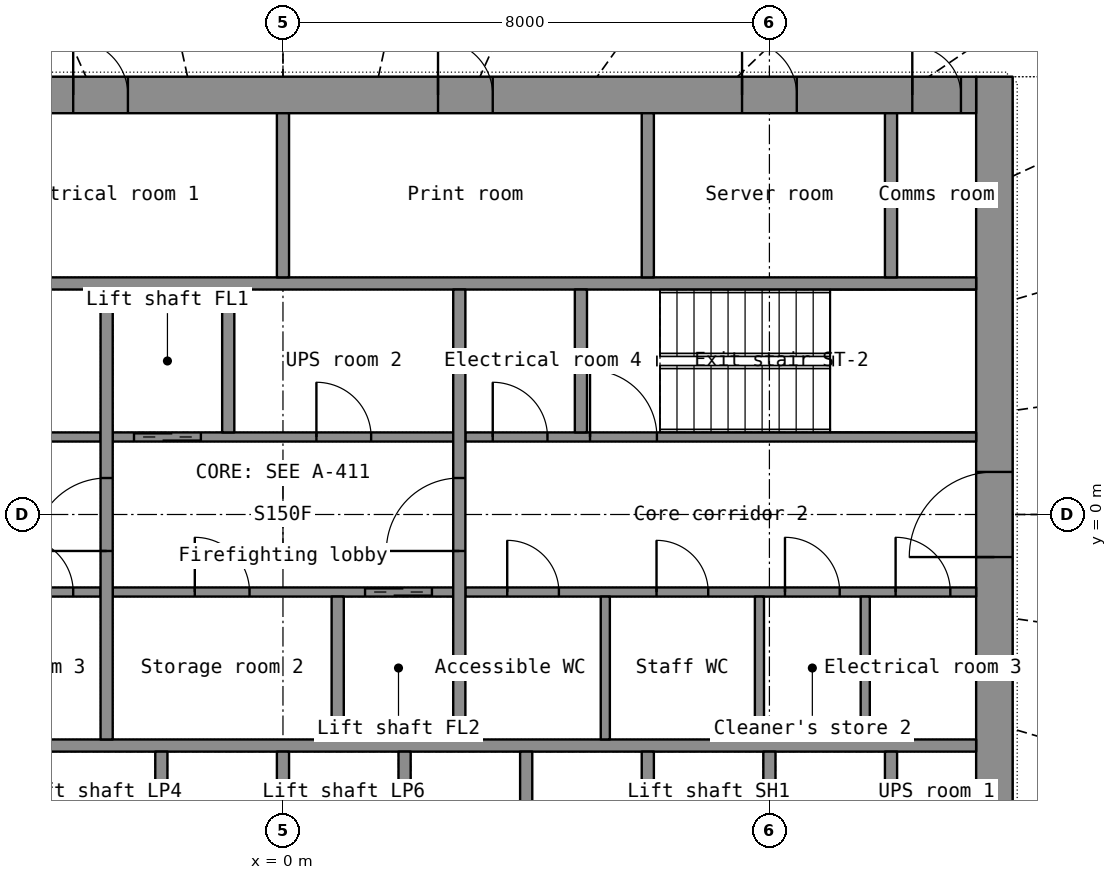
"""IFC4 building model, lengths in metres.
Left out: names, types, materials, properties, quantities, classifications, styles, units other than length and angle.
Written with IfcOpenShell. Run it as: python <this file> out.ifc"""

import sys

from ifc_helpers import new_model, si_unit, direction, frame, frame_2d, origin, place, context, subcontext, project, spatial, rectangle, extrude, element, fill, save


model = new_model("IFC4")
c1 = context("Model", 3, precision=1e-05, world=origin(), true_north=direction((0.0, 1.0)))
c2 = subcontext(c1, "Body", "Model", "MODEL_VIEW")
j1 = project(units=[si_unit("LENGTHUNIT", "METRE"), si_unit("PLANEANGLEUNIT", "RADIAN")], contexts=[c1])
p1 = place(None, origin())
s1 = spatial("IfcSite", under=j1, at=p1, CompositionType="ELEMENT")
p2 = place(p1, origin())
s2 = spatial("IfcBuilding", under=s1, at=p2, CompositionType="ELEMENT")
p3 = place(p2, frame((0.0, 0.0, 74.1)))
s3 = spatial("IfcBuildingStorey", under=s2, at=p3, CompositionType="ELEMENT", Elevation=74.1)
p4 = place(p3, frame((11.7, -7.2, 0.0), z_axis=(0.0, 0.0, 1.0), x_axis=(0.0, 1.0, 0.0)))
e1 = element("IfcWall", 1, at=p4, inside=s3, PredefinedType="SHEAR", context=c2, shape_type="SweptSolid", body=[
    extrude(rectangle(XDim=14.4, YDim=0.6, at=frame_2d((7.2, 0.0))), origin(), (0.0, 0.0, 1.0), 3.3),
])
p5 = place(p4, frame((6.5, 0.0, 0.0)))
e2 = element("IfcOpeningElement", 2, at=p5, cuts=e1, PredefinedType="OPENING", context=c2, shape_type="SweptSolid", body=[
    extrude(rectangle(XDim=1.4, YDim=2.2, at=frame_2d((0.7, 1.1))), frame((0.0, 0.31, 0.0), z_axis=(0.0, -1.0, 0.0), x_axis=(1.0, 0.0, 0.0)), (0.0, 0.0, 1.0), 0.62),
])
p6 = place(p3, frame((-11.4, 6.9, 0.0), z_axis=(0.0, 0.0, 1.0), x_axis=(1.0, 0.0, 0.0)))
e3 = element("IfcWall", 3, at=p6, inside=s3, PredefinedType="SHEAR", context=c2, shape_type="SweptSolid", body=[
    extrude(rectangle(XDim=22.8, YDim=0.6, at=frame_2d((11.4, 0.0))), origin(), (0.0, 0.0, 1.0), 3.3),
])
p7 = place(p6, frame((1.85, 0.0, 0.0)))
e4 = element("IfcOpeningElement", 4, at=p7, cuts=e3, PredefinedType="OPENING", context=c2, shape_type="SweptSolid", body=[
    extrude(rectangle(XDim=1.1, YDim=2.2, at=frame_2d((0.55, 1.1))), frame((0.0, 0.31, 0.0), z_axis=(0.0, -1.0, 0.0), x_axis=(1.0, 0.0, 0.0)), (0.0, 0.0, 1.0), 0.62),
])
p8 = place(p6, frame((7.95, 0.0, 0.0)))
e5 = element("IfcOpeningElement", 5, at=p8, cuts=e3, PredefinedType="OPENING", context=c2, shape_type="SweptSolid", body=[
    extrude(rectangle(XDim=0.9, YDim=2.1, at=frame_2d((0.45, 1.05))), frame((0.0, 0.31, 0.0), z_axis=(0.0, -1.0, 0.0), x_axis=(1.0, 0.0, 0.0)), (0.0, 0.0, 1.0), 0.62),
])
p9 = place(p6, frame((13.95, 0.0, 0.0)))
e6 = element("IfcOpeningElement", 6, at=p9, cuts=e3, PredefinedType="OPENING", context=c2, shape_type="SweptSolid", body=[
    extrude(rectangle(XDim=0.9, YDim=2.1, at=frame_2d((0.45, 1.05))), frame((0.0, 0.31, 0.0), z_axis=(0.0, -1.0, 0.0), x_axis=(1.0, 0.0, 0.0)), (0.0, 0.0, 1.0), 0.62),
])
p10 = place(p6, frame((18.95, 0.0, 0.0)))
e7 = element("IfcOpeningElement", 7, at=p10, cuts=e3, PredefinedType="OPENING", context=c2, shape_type="SweptSolid", body=[
    extrude(rectangle(XDim=0.9, YDim=2.1, at=frame_2d((0.45, 1.05))), frame((0.0, 0.31, 0.0), z_axis=(0.0, -1.0, 0.0), x_axis=(1.0, 0.0, 0.0)), (0.0, 0.0, 1.0), 0.62),
])
p11 = place(p6, frame((0.25, 0.0, 0.0)))
e8 = element("IfcOpeningElement", 8, at=p11, cuts=e3, PredefinedType="OPENING", context=c2, shape_type="SweptSolid", body=[
    extrude(rectangle(XDim=0.8, YDim=2.05, at=frame_2d((0.4, 1.025))), frame((0.0, 0.31, 0.0), z_axis=(0.0, -1.0, 0.0), x_axis=(1.0, 0.0, 0.0)), (0.0, 0.0, 1.0), 0.62),
])
p12 = place(p6, frame((21.75, 0.0, 0.0)))
e9 = element("IfcOpeningElement", 9, at=p12, cuts=e3, PredefinedType="OPENING", context=c2, shape_type="SweptSolid", body=[
    extrude(rectangle(XDim=0.8, YDim=2.05, at=frame_2d((0.4, 1.025))), frame((0.0, 0.31, 0.0), z_axis=(0.0, -1.0, 0.0), x_axis=(1.0, 0.0, 0.0)), (0.0, 0.0, 1.0), 0.62),
])
for number, where, z_axis, x_axis in (
    (10, (-11.4, -3.8, 0.0), (0.0, 0.0, 1.0), (1.0, 0.0, 0.0)),
    (11, (-11.4, 3.8, 0.0), (0.0, 0.0, 1.0), (1.0, 0.0, 0.0)),
):
    element("IfcWall", number, at=place(p3, frame(where, z_axis=z_axis, x_axis=x_axis)), inside=s3, PredefinedType="SHEAR", context=c2, shape_type="SweptSolid", body=[
        extrude(rectangle(XDim=22.8, YDim=0.2, at=frame_2d((11.4, 0.0))), origin(), (0.0, 0.0, 1.0), 3.3),
    ])
for number, where, z_axis, x_axis in (
    (12, (-2.0, -6.6, 0.0), (0.0, 0.0, 1.0), (0.0, 1.0, 0.0)),
    (13, (0.0, -6.6, 0.0), (0.0, 0.0, 1.0), (0.0, 1.0, 0.0)),
    (14, (2.0, -6.6, 0.0), (0.0, 0.0, 1.0), (0.0, 1.0, 0.0)),
    (15, (4.0, -6.6, 0.0), (0.0, 0.0, 1.0), (0.0, 1.0, 0.0)),
    (16, (6.0, -6.6, 0.0), (0.0, 0.0, 1.0), (0.0, 1.0, 0.0)),
    (17, (8.0, -6.6, 0.0), (0.0, 0.0, 1.0), (0.0, 1.0, 0.0)),
    (18, (10.0, -6.6, 0.0), (0.0, 0.0, 1.0), (0.0, 1.0, 0.0)),
    (19, (10.0, 3.9, 0.0), (0.0, 0.0, 1.0), (0.0, 1.0, 0.0)),
):
    element("IfcWall", number, at=place(p3, frame(where, z_axis=z_axis, x_axis=x_axis)), inside=s3, PredefinedType="SHEAR", context=c2, shape_type="SweptSolid", body=[
        extrude(rectangle(XDim=2.7, YDim=0.2, at=frame_2d((1.35, 0.0))), origin(), (0.0, 0.0, 1.0), 3.3),
    ])
for number, where, z_axis, x_axis in (
    (20, (0.0, 3.9, 0.0), (0.0, 0.0, 1.0), (0.0, 1.0, 0.0)),
    (21, (6.0, 3.9, 0.0), (0.0, 0.0, 1.0), (0.0, 1.0, 0.0)),
):
    element("IfcWall", number, at=place(p3, frame(where, z_axis=z_axis, x_axis=x_axis)), inside=s3, PredefinedType="PARTITIONING", context=c2, shape_type="SweptSolid", body=[
        extrude(rectangle(XDim=2.7, YDim=0.2, at=frame_2d((1.35, 0.0))), origin(), (0.0, 0.0, 1.0), 3.3),
    ])
p13 = place(p3, frame((-11.4, -1.275, 0.0), z_axis=(0.0, 0.0, 1.0), x_axis=(1.0, 0.0, 0.0)))
e22 = element("IfcWall", 22, at=p13, inside=s3, PredefinedType="SHEAR", context=c2, shape_type="SweptSolid", body=[
    extrude(rectangle(XDim=8.4, YDim=0.15, at=frame_2d((4.2, 0.0))), origin(), (0.0, 0.0, 1.0), 3.3),
])
p14 = place(p13, frame((5.25, 0.0, 0.0)))
e23 = element("IfcOpeningElement", 23, at=p14, cuts=e22, PredefinedType="OPENING", context=c2, shape_type="SweptSolid", body=[
    extrude(rectangle(XDim=1.1, YDim=2.15, at=frame_2d((0.55, 1.075))), frame((0.0, 0.085, 0.0), z_axis=(0.0, -1.0, 0.0), x_axis=(1.0, 0.0, 0.0)), (0.0, 0.0, 1.0), 0.17),
])
p15 = place(p13, frame((7.05, 0.0, 0.0)))
e24 = element("IfcOpeningElement", 24, at=p15, cuts=e22, PredefinedType="OPENING", context=c2, shape_type="SweptSolid", body=[
    extrude(rectangle(XDim=0.9, YDim=2.1, at=frame_2d((0.45, 1.05))), frame((0.0, 0.085, 0.0), z_axis=(0.0, -1.0, 0.0), x_axis=(1.0, 0.0, 0.0)), (0.0, 0.0, 1.0), 0.17),
])
p16 = place(p3, frame((-2.8, -1.275, 0.0), z_axis=(0.0, 0.0, 1.0), x_axis=(1.0, 0.0, 0.0)))
e25 = element("IfcWall", 25, at=p16, inside=s3, PredefinedType="SHEAR", context=c2, shape_type="SweptSolid", body=[
    extrude(rectangle(XDim=5.6, YDim=0.15, at=frame_2d((2.8, 0.0))), origin(), (0.0, 0.0, 1.0), 3.3),
])
p17 = place(p16, frame((4.15, 0.0, 0.0)))
e26 = element("IfcOpeningElement", 26, at=p17, cuts=e25, PredefinedType="OPENING", context=c2, shape_type="SweptSolid", body=[
    extrude(rectangle(XDim=1.1, YDim=2.2, at=frame_2d((0.55, 1.1))), frame((0.0, 0.085, 0.0), z_axis=(0.0, -1.0, 0.0), x_axis=(1.0, 0.0, 0.0)), (0.0, 0.0, 1.0), 0.17),
])
p18 = place(p16, frame((1.35, 0.0, 0.0)))
e27 = element("IfcOpeningElement", 27, at=p18, cuts=e25, PredefinedType="OPENING", context=c2, shape_type="SweptSolid", body=[
    extrude(rectangle(XDim=0.9, YDim=2.1, at=frame_2d((0.45, 1.05))), frame((0.0, 0.085, 0.0), z_axis=(0.0, -1.0, 0.0), x_axis=(1.0, 0.0, 0.0)), (0.0, 0.0, 1.0), 0.17),
])
p19 = place(p3, frame((3.0, -1.275, 0.0), z_axis=(0.0, 0.0, 1.0), x_axis=(1.0, 0.0, 0.0)))
e28 = element("IfcWall", 28, at=p19, inside=s3, PredefinedType="PARTITIONING", context=c2, shape_type="SweptSolid", body=[
    extrude(rectangle(XDim=8.4, YDim=0.15, at=frame_2d((4.2, 0.0))), origin(), (0.0, 0.0, 1.0), 3.3),
])
p20 = place(p19, frame((0.688, 0.0, 0.0)))
e29 = element("IfcOpeningElement", 29, at=p20, cuts=e28, PredefinedType="OPENING", context=c2, shape_type="SweptSolid", body=[
    extrude(rectangle(XDim=0.85, YDim=2.1, at=frame_2d((0.425, 1.05))), frame((0.0, 0.085, 0.0), z_axis=(0.0, -1.0, 0.0), x_axis=(1.0, 0.0, 0.0)), (0.0, 0.0, 1.0), 0.17),
])
p21 = place(p19, frame((3.144, 0.0, 0.0)))
e30 = element("IfcOpeningElement", 30, at=p21, cuts=e28, PredefinedType="OPENING", context=c2, shape_type="SweptSolid", body=[
    extrude(rectangle(XDim=0.85, YDim=2.1, at=frame_2d((0.425, 1.05))), frame((0.0, 0.085, 0.0), z_axis=(0.0, -1.0, 0.0), x_axis=(1.0, 0.0, 0.0)), (0.0, 0.0, 1.0), 0.17),
])
p22 = place(p19, frame((5.256, 0.0, 0.0)))
e31 = element("IfcOpeningElement", 31, at=p22, cuts=e28, PredefinedType="OPENING", context=c2, shape_type="SweptSolid", body=[
    extrude(rectangle(XDim=0.9, YDim=2.1, at=frame_2d((0.45, 1.05))), frame((0.0, 0.085, 0.0), z_axis=(0.0, -1.0, 0.0), x_axis=(1.0, 0.0, 0.0)), (0.0, 0.0, 1.0), 0.17),
])
p23 = place(p19, frame((7.075, 0.0, 0.0)))
e32 = element("IfcOpeningElement", 32, at=p23, cuts=e28, PredefinedType="OPENING", context=c2, shape_type="SweptSolid", body=[
    extrude(rectangle(XDim=0.9, YDim=2.1, at=frame_2d((0.45, 1.05))), frame((0.0, 0.085, 0.0), z_axis=(0.0, -1.0, 0.0), x_axis=(1.0, 0.0, 0.0)), (0.0, 0.0, 1.0), 0.17),
])
p24 = place(p3, frame((-11.4, 1.275, 0.0), z_axis=(0.0, 0.0, 1.0), x_axis=(1.0, 0.0, 0.0)))
e33 = element("IfcWall", 33, at=p24, inside=s3, PredefinedType="PARTITIONING", context=c2, shape_type="SweptSolid", body=[
    extrude(rectangle(XDim=8.4, YDim=0.15, at=frame_2d((4.2, 0.0))), origin(), (0.0, 0.0, 1.0), 3.3),
])
p25 = place(p24, frame((0.522, 0.0, 0.0)))
e34 = element("IfcOpeningElement", 34, at=p25, cuts=e33, PredefinedType="OPENING", context=c2, shape_type="SweptSolid", body=[
    extrude(rectangle(XDim=0.9, YDim=2.1, at=frame_2d((0.45, 1.05))), frame((0.0, 0.085, 0.0), z_axis=(0.0, -1.0, 0.0), x_axis=(1.0, 0.0, 0.0)), (0.0, 0.0, 1.0), 0.17),
])
p26 = place(p24, frame((3.208, 0.0, 0.0)))
e35 = element("IfcOpeningElement", 35, at=p26, cuts=e33, PredefinedType="OPENING", context=c2, shape_type="SweptSolid", body=[
    extrude(rectangle(XDim=0.85, YDim=2.1, at=frame_2d((0.425, 1.05))), frame((0.0, 0.085, 0.0), z_axis=(0.0, -1.0, 0.0), x_axis=(1.0, 0.0, 0.0)), (0.0, 0.0, 1.0), 0.17),
])
p27 = place(p24, frame((6.436, 0.0, 0.0)))
e36 = element("IfcOpeningElement", 36, at=p27, cuts=e33, PredefinedType="OPENING", context=c2, shape_type="SweptSolid", body=[
    extrude(rectangle(XDim=0.85, YDim=2.1, at=frame_2d((0.425, 1.05))), frame((0.0, 0.085, 0.0), z_axis=(0.0, -1.0, 0.0), x_axis=(1.0, 0.0, 0.0)), (0.0, 0.0, 1.0), 0.17),
])
p28 = place(p3, frame((-2.8, 1.275, 0.0), z_axis=(0.0, 0.0, 1.0), x_axis=(1.0, 0.0, 0.0)))
e37 = element("IfcWall", 37, at=p28, inside=s3, PredefinedType="SHEAR", context=c2, shape_type="SweptSolid", body=[
    extrude(rectangle(XDim=5.6, YDim=0.15, at=frame_2d((2.8, 0.0))), origin(), (0.0, 0.0, 1.0), 3.3),
])
p29 = place(p28, frame((0.35, 0.0, 0.0)))
e38 = element("IfcOpeningElement", 38, at=p29, cuts=e37, PredefinedType="OPENING", context=c2, shape_type="SweptSolid", body=[
    extrude(rectangle(XDim=1.1, YDim=2.2, at=frame_2d((0.55, 1.1))), frame((0.0, 0.085, 0.0), z_axis=(0.0, -1.0, 0.0), x_axis=(1.0, 0.0, 0.0)), (0.0, 0.0, 1.0), 0.17),
])
p30 = place(p28, frame((3.35, 0.0, 0.0)))
e39 = element("IfcOpeningElement", 39, at=p30, cuts=e37, PredefinedType="OPENING", context=c2, shape_type="SweptSolid", body=[
    extrude(rectangle(XDim=0.9, YDim=2.1, at=frame_2d((0.45, 1.05))), frame((0.0, 0.085, 0.0), z_axis=(0.0, -1.0, 0.0), x_axis=(1.0, 0.0, 0.0)), (0.0, 0.0, 1.0), 0.17),
])
p31 = place(p3, frame((3.0, 1.275, 0.0), z_axis=(0.0, 0.0, 1.0), x_axis=(1.0, 0.0, 0.0)))
e40 = element("IfcWall", 40, at=p31, inside=s3, PredefinedType="SHEAR", context=c2, shape_type="SweptSolid", body=[
    extrude(rectangle(XDim=8.4, YDim=0.15, at=frame_2d((4.2, 0.0))), origin(), (0.0, 0.0, 1.0), 3.3),
])
p32 = place(p31, frame((2.05, 0.0, 0.0)))
e41 = element("IfcOpeningElement", 41, at=p32, cuts=e40, PredefinedType="OPENING", context=c2, shape_type="SweptSolid", body=[
    extrude(rectangle(XDim=1.1, YDim=2.15, at=frame_2d((0.55, 1.075))), frame((0.0, 0.085, 0.0), z_axis=(0.0, -1.0, 0.0), x_axis=(1.0, 0.0, 0.0)), (0.0, 0.0, 1.0), 0.17),
])
p33 = place(p31, frame((0.45, 0.0, 0.0)))
e42 = element("IfcOpeningElement", 42, at=p33, cuts=e40, PredefinedType="OPENING", context=c2, shape_type="SweptSolid", body=[
    extrude(rectangle(XDim=0.9, YDim=2.1, at=frame_2d((0.45, 1.05))), frame((0.0, 0.085, 0.0), z_axis=(0.0, -1.0, 0.0), x_axis=(1.0, 0.0, 0.0)), (0.0, 0.0, 1.0), 0.17),
])
p34 = place(p3, frame((-2.9, -3.7, 0.0), z_axis=(0.0, 0.0, 1.0), x_axis=(0.0, 1.0, 0.0)))
e43 = element("IfcWall", 43, at=p34, inside=s3, PredefinedType="SHEAR", context=c2, shape_type="SweptSolid", body=[
    extrude(rectangle(XDim=7.4, YDim=0.2, at=frame_2d((3.7, 0.0))), origin(), (0.0, 0.0, 1.0), 3.3),
])
p35 = place(p34, frame((3.1, 0.0, 0.0)))
e44 = element("IfcOpeningElement", 44, at=p35, cuts=e43, PredefinedType="OPENING", context=c2, shape_type="SweptSolid", body=[
    extrude(rectangle(XDim=1.2, YDim=2.2, at=frame_2d((0.6, 1.1))), frame((0.0, 0.11, 0.0), z_axis=(0.0, -1.0, 0.0), x_axis=(1.0, 0.0, 0.0)), (0.0, 0.0, 1.0), 0.22),
])
p36 = place(p3, frame((2.9, -3.7, 0.0), z_axis=(0.0, 0.0, 1.0), x_axis=(0.0, 1.0, 0.0)))
e45 = element("IfcWall", 45, at=p36, inside=s3, PredefinedType="SHEAR", context=c2, shape_type="SweptSolid", body=[
    extrude(rectangle(XDim=7.4, YDim=0.2, at=frame_2d((3.7, 0.0))), origin(), (0.0, 0.0, 1.0), 3.3),
])
p37 = place(p36, frame((3.1, 0.0, 0.0)))
e46 = element("IfcOpeningElement", 46, at=p37, cuts=e45, PredefinedType="OPENING", context=c2, shape_type="SweptSolid", body=[
    extrude(rectangle(XDim=1.2, YDim=2.2, at=frame_2d((0.6, 1.1))), frame((0.0, 0.11, 0.0), z_axis=(0.0, -1.0, 0.0), x_axis=(1.0, 0.0, 0.0)), (0.0, 0.0, 1.0), 0.22),
])
for number, where, z_axis, x_axis in (
    (47, (-0.9, 1.35, 0.0), (0.0, 0.0, 1.0), (0.0, 1.0, 0.0)),
    (48, (0.9, -3.7, 0.0), (0.0, 0.0, 1.0), (0.0, 1.0, 0.0)),
    (49, (4.9, 1.35, 0.0), (0.0, 0.0, 1.0), (0.0, 1.0, 0.0)),
):
    element("IfcWall", number, at=place(p3, frame(where, z_axis=z_axis, x_axis=x_axis)), inside=s3, PredefinedType="SHEAR", context=c2, shape_type="SweptSolid", body=[
        extrude(rectangle(XDim=2.35, YDim=0.2, at=frame_2d((1.175, 0.0))), origin(), (0.0, 0.0, 1.0), 3.3),
    ])
for number, where, z_axis, x_axis in (
    (50, (5.301, -3.7, 0.0), (0.0, 0.0, 1.0), (0.0, 1.0, 0.0)),
    (51, (7.836, -3.7, 0.0), (0.0, 0.0, 1.0), (0.0, 1.0, 0.0)),
    (52, (9.576, -3.7, 0.0), (0.0, 0.0, 1.0), (0.0, 1.0, 0.0)),
):
    element("IfcWall", number, at=place(p3, frame(where, z_axis=z_axis, x_axis=x_axis)), inside=s3, PredefinedType="PARTITIONING", context=c2, shape_type="SweptSolid", body=[
        extrude(rectangle(XDim=2.35, YDim=0.15, at=frame_2d((1.175, 0.0))), origin(), (0.0, 0.0, 1.0), 3.3),
    ])
p38 = place(p8, origin())
e53 = element("IfcDoor", 53, at=p38, inside=s3, OperationType="SINGLE_SWING_LEFT", PredefinedType="DOOR", context=c2, shape_type="SweptSolid", body=[
    extrude(rectangle(XDim=0.9, YDim=2.1, at=frame_2d((0.45, 1.05))), frame((0.0, 0.025, 0.0), z_axis=(0.0, -1.0, 0.0), x_axis=(1.0, 0.0, 0.0)), (0.0, 0.0, 1.0), 0.05),
])
fill(e5, e53)
p39 = place(p9, origin())
e54 = element("IfcDoor", 54, at=p39, inside=s3, OperationType="SINGLE_SWING_LEFT", PredefinedType="DOOR", context=c2, shape_type="SweptSolid", body=[
    extrude(rectangle(XDim=0.9, YDim=2.1, at=frame_2d((0.45, 1.05))), frame((0.0, 0.025, 0.0), z_axis=(0.0, -1.0, 0.0), x_axis=(1.0, 0.0, 0.0)), (0.0, 0.0, 1.0), 0.05),
])
fill(e6, e54)
p40 = place(p10, origin())
e55 = element("IfcDoor", 55, at=p40, inside=s3, OperationType="SINGLE_SWING_LEFT", PredefinedType="DOOR", context=c2, shape_type="SweptSolid", body=[
    extrude(rectangle(XDim=0.9, YDim=2.1, at=frame_2d((0.45, 1.05))), frame((0.0, 0.025, 0.0), z_axis=(0.0, -1.0, 0.0), x_axis=(1.0, 0.0, 0.0)), (0.0, 0.0, 1.0), 0.05),
])
fill(e7, e55)
p41 = place(p12, origin())
e56 = element("IfcDoor", 56, at=p41, inside=s3, OperationType="SINGLE_SWING_LEFT", PredefinedType="DOOR", context=c2, shape_type="SweptSolid", body=[
    extrude(rectangle(XDim=0.8, YDim=2.05, at=frame_2d((0.4, 1.025))), frame((0.0, 0.025, 0.0), z_axis=(0.0, -1.0, 0.0), x_axis=(1.0, 0.0, 0.0)), (0.0, 0.0, 1.0), 0.05),
])
fill(e9, e56)
p42 = place(p5, origin())
e57 = element("IfcDoor", 57, at=p42, inside=s3, OperationType="DOUBLE_DOOR_SINGLE_SWING", PredefinedType="DOOR", context=c2, shape_type="SweptSolid", body=[
    extrude(rectangle(XDim=1.4, YDim=2.2, at=frame_2d((0.7, 1.1))), frame((0.0, 0.025, 0.0), z_axis=(0.0, -1.0, 0.0), x_axis=(1.0, 0.0, 0.0)), (0.0, 0.0, 1.0), 0.05),
])
fill(e2, e57)
p43 = place(p35, origin())
e58 = element("IfcDoor", 58, at=p43, inside=s3, OperationType="SINGLE_SWING_LEFT", PredefinedType="DOOR", context=c2, shape_type="SweptSolid", body=[
    extrude(rectangle(XDim=1.2, YDim=2.2, at=frame_2d((0.6, 1.1))), frame((0.0, 0.025, 0.0), z_axis=(0.0, -1.0, 0.0), x_axis=(1.0, 0.0, 0.0)), (0.0, 0.0, 1.0), 0.05),
])
fill(e44, e58)
p44 = place(p37, origin())
e59 = element("IfcDoor", 59, at=p44, inside=s3, OperationType="SINGLE_SWING_LEFT", PredefinedType="DOOR", context=c2, shape_type="SweptSolid", body=[
    extrude(rectangle(XDim=1.2, YDim=2.2, at=frame_2d((0.6, 1.1))), frame((0.0, 0.025, 0.0), z_axis=(0.0, -1.0, 0.0), x_axis=(1.0, 0.0, 0.0)), (0.0, 0.0, 1.0), 0.05),
])
fill(e46, e59)
p45 = place(p29, origin())
e60 = element("IfcDoor", 60, at=p45, inside=s3, OperationType="DOUBLE_DOOR_SLIDING", PredefinedType="DOOR", context=c2, shape_type="SweptSolid", body=[
    extrude(rectangle(XDim=1.1, YDim=2.2, at=frame_2d((0.55, 1.1))), frame((0.0, 0.025, 0.0), z_axis=(0.0, -1.0, 0.0), x_axis=(1.0, 0.0, 0.0)), (0.0, 0.0, 1.0), 0.05),
])
fill(e38, e60)
p46 = place(p17, origin())
e61 = element("IfcDoor", 61, at=p46, inside=s3, OperationType="DOUBLE_DOOR_SLIDING", PredefinedType="DOOR", context=c2, shape_type="SweptSolid", body=[
    extrude(rectangle(XDim=1.1, YDim=2.2, at=frame_2d((0.55, 1.1))), frame((0.0, 0.025, 0.0), z_axis=(0.0, -1.0, 0.0), x_axis=(1.0, 0.0, 0.0)), (0.0, 0.0, 1.0), 0.05),
])
fill(e26, e61)
p47 = place(p32, origin())
e62 = element("IfcDoor", 62, at=p47, inside=s3, OperationType="SINGLE_SWING_LEFT", PredefinedType="DOOR", context=c2, shape_type="SweptSolid", body=[
    extrude(rectangle(XDim=1.1, YDim=2.15, at=frame_2d((0.55, 1.075))), frame((0.0, 0.025, 0.0), z_axis=(0.0, -1.0, 0.0), x_axis=(1.0, 0.0, 0.0)), (0.0, 0.0, 1.0), 0.05),
])
fill(e41, e62)
p48 = place(p20, origin())
e63 = element("IfcDoor", 63, at=p48, inside=s3, OperationType="SINGLE_SWING_LEFT", PredefinedType="DOOR", context=c2, shape_type="SweptSolid", body=[
    extrude(rectangle(XDim=0.85, YDim=2.1, at=frame_2d((0.425, 1.05))), frame((0.0, 0.025, 0.0), z_axis=(0.0, -1.0, 0.0), x_axis=(1.0, 0.0, 0.0)), (0.0, 0.0, 1.0), 0.05),
])
fill(e29, e63)
p49 = place(p21, origin())
e64 = element("IfcDoor", 64, at=p49, inside=s3, OperationType="SINGLE_SWING_LEFT", PredefinedType="DOOR", context=c2, shape_type="SweptSolid", body=[
    extrude(rectangle(XDim=0.85, YDim=2.1, at=frame_2d((0.425, 1.05))), frame((0.0, 0.025, 0.0), z_axis=(0.0, -1.0, 0.0), x_axis=(1.0, 0.0, 0.0)), (0.0, 0.0, 1.0), 0.05),
])
fill(e30, e64)
p50 = place(p22, origin())
e65 = element("IfcDoor", 65, at=p50, inside=s3, OperationType="SINGLE_SWING_LEFT", PredefinedType="DOOR", context=c2, shape_type="SweptSolid", body=[
    extrude(rectangle(XDim=0.9, YDim=2.1, at=frame_2d((0.45, 1.05))), frame((0.0, 0.025, 0.0), z_axis=(0.0, -1.0, 0.0), x_axis=(1.0, 0.0, 0.0)), (0.0, 0.0, 1.0), 0.05),
])
fill(e31, e65)
p51 = place(p23, origin())
e66 = element("IfcDoor", 66, at=p51, inside=s3, OperationType="SINGLE_SWING_LEFT", PredefinedType="DOOR", context=c2, shape_type="SweptSolid", body=[
    extrude(rectangle(XDim=0.9, YDim=2.1, at=frame_2d((0.45, 1.05))), frame((0.0, 0.025, 0.0), z_axis=(0.0, -1.0, 0.0), x_axis=(1.0, 0.0, 0.0)), (0.0, 0.0, 1.0), 0.05),
])
fill(e32, e66)
p52 = place(p30, origin())
e67 = element("IfcDoor", 67, at=p52, inside=s3, OperationType="SINGLE_SWING_LEFT", PredefinedType="DOOR", context=c2, shape_type="SweptSolid", body=[
    extrude(rectangle(XDim=0.9, YDim=2.1, at=frame_2d((0.45, 1.05))), frame((0.0, 0.025, 0.0), z_axis=(0.0, -1.0, 0.0), x_axis=(1.0, 0.0, 0.0)), (0.0, 0.0, 1.0), 0.05),
])
fill(e39, e67)
p53 = place(p18, origin())
e68 = element("IfcDoor", 68, at=p53, inside=s3, OperationType="SINGLE_SWING_LEFT", PredefinedType="DOOR", context=c2, shape_type="SweptSolid", body=[
    extrude(rectangle(XDim=0.9, YDim=2.1, at=frame_2d((0.45, 1.05))), frame((0.0, 0.025, 0.0), z_axis=(0.0, -1.0, 0.0), x_axis=(1.0, 0.0, 0.0)), (0.0, 0.0, 1.0), 0.05),
])
fill(e27, e68)
p54 = place(p33, origin())
e69 = element("IfcDoor", 69, at=p54, inside=s3, OperationType="SINGLE_SWING_LEFT", PredefinedType="DOOR", context=c2, shape_type="SweptSolid", body=[
    extrude(rectangle(XDim=0.9, YDim=2.1, at=frame_2d((0.45, 1.05))), frame((0.0, 0.025, 0.0), z_axis=(0.0, -1.0, 0.0), x_axis=(1.0, 0.0, 0.0)), (0.0, 0.0, 1.0), 0.05),
])
fill(e42, e69)
p55 = place(p15, origin())
e70 = element("IfcDoor", 70, at=p55, inside=s3, OperationType="SINGLE_SWING_LEFT", PredefinedType="DOOR", context=c2, shape_type="SweptSolid", body=[
    extrude(rectangle(XDim=0.9, YDim=2.1, at=frame_2d((0.45, 1.05))), frame((0.0, 0.025, 0.0), z_axis=(0.0, -1.0, 0.0), x_axis=(1.0, 0.0, 0.0)), (0.0, 0.0, 1.0), 0.05),
])
fill(e24, e70)
save(model, sys.argv[1])
